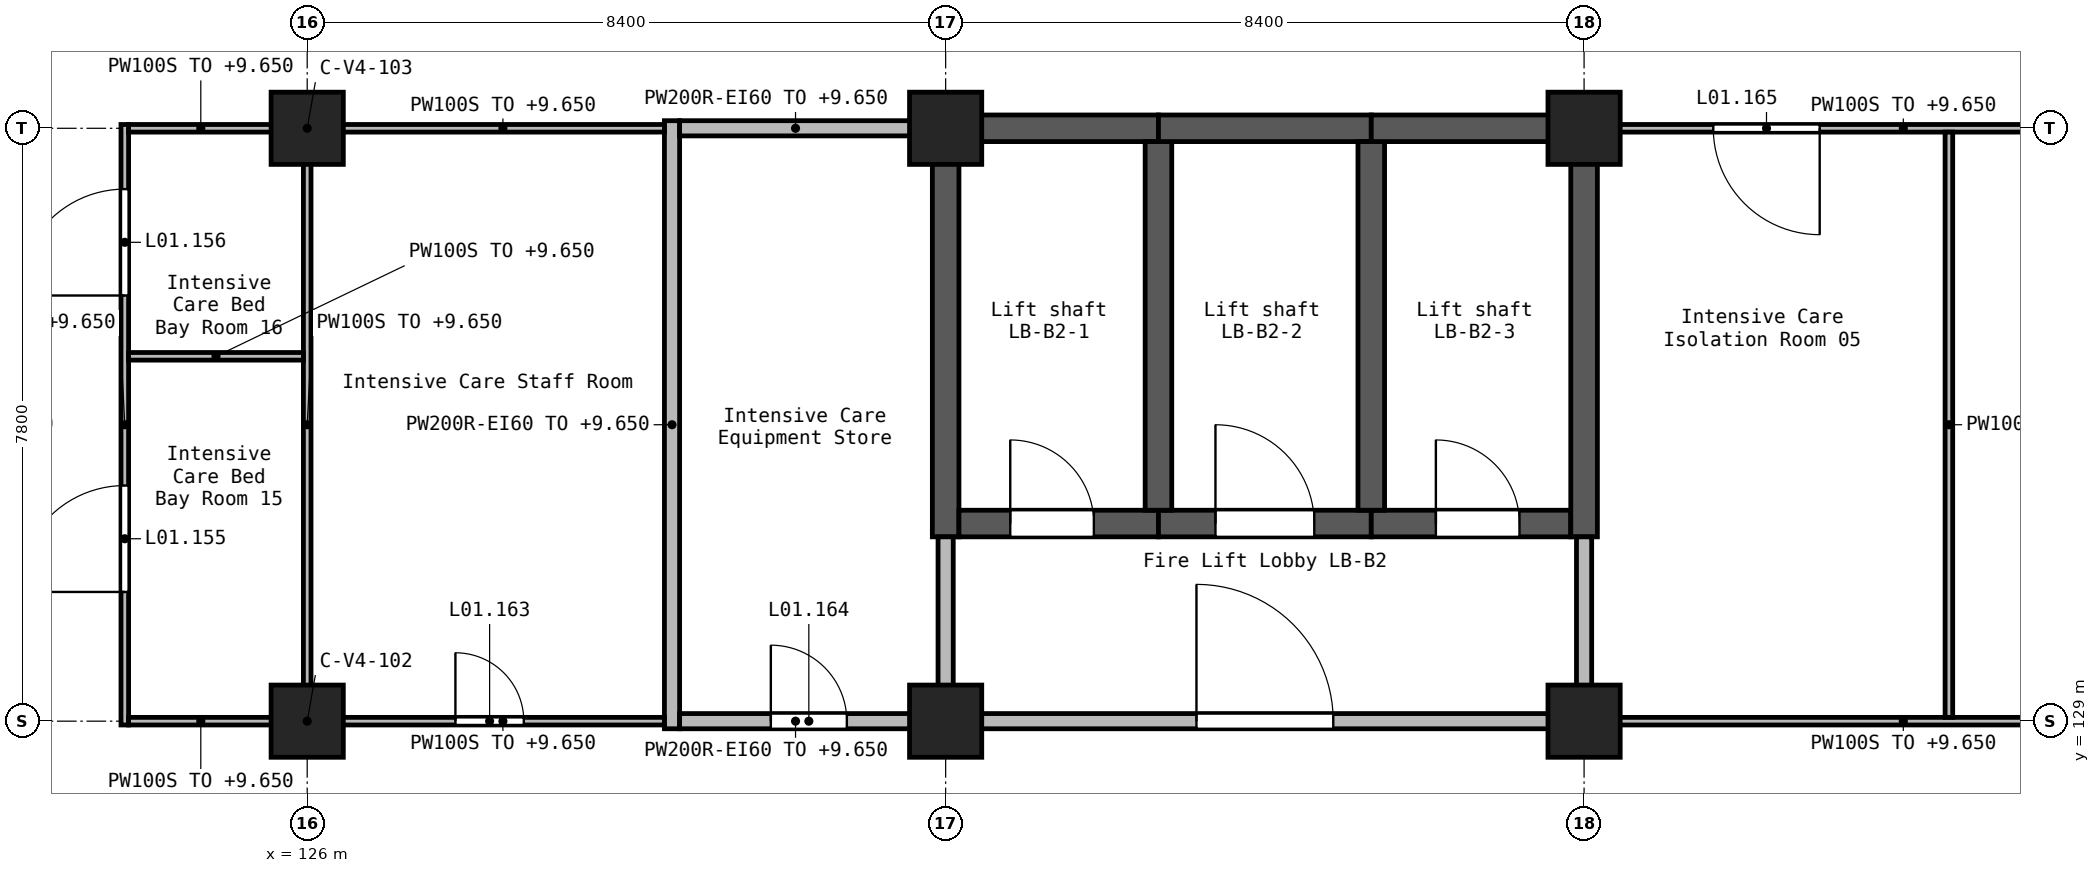
"""IFC4 building model, lengths in metres.
Left out: names, types, materials, properties, quantities, classifications, styles, units other than length and angle.
Written with IfcOpenShell. Run it as: python <this file> out.ifc"""

import sys

from ifc_helpers import new_model, si_unit, direction, frame, frame_2d, origin, origin_2d, place, context, subcontext, project, spatial, rectangle, extrude, element, fill, save


model = new_model("IFC4")
c1 = context("Model", 3, precision=1e-05, world=origin(), true_north=direction((0.0, 1.0)))
c2 = subcontext(c1, "Body", "Model", "MODEL_VIEW")
j1 = project(units=[si_unit("LENGTHUNIT", "METRE"), si_unit("PLANEANGLEUNIT", "RADIAN")], contexts=[c1])
p1 = place(None, origin())
s1 = spatial("IfcSite", under=j1, at=p1, CompositionType="ELEMENT")
p2 = place(p1, origin())
s2 = spatial("IfcBuilding", under=s1, at=p2, CompositionType="ELEMENT")
p3 = place(p2, frame((0.0, 0.0, 5.4)))
s3 = spatial("IfcBuildingStorey", under=s2, at=p3, CompositionType="ELEMENT", Elevation=5.4)
for number, where, z_axis, x_axis in (
    (1, (126.0, 129.0, 0.0), (0.0, 0.0, 1.0), (1.0, 0.0, 0.0)),
    (2, (126.0, 136.8, 0.0), (0.0, 0.0, 1.0), (1.0, 0.0, 0.0)),
    (3, (134.4, 129.0, 0.0), (0.0, 0.0, 1.0), (1.0, 0.0, 0.0)),
    (4, (134.4, 136.8, 0.0), (0.0, 0.0, 1.0), (1.0, 0.0, 0.0)),
    (5, (142.8, 129.0, 0.0), (0.0, 0.0, 1.0), (1.0, 0.0, 0.0)),
    (6, (142.8, 136.8, 0.0), (0.0, 0.0, 1.0), (1.0, 0.0, 0.0)),
):
    element("IfcColumn", number, at=place(p3, frame(where, z_axis=z_axis, x_axis=x_axis)), inside=s3, PredefinedType="COLUMN", context=c2, shape_type="SweptSolid", body=[
        extrude(rectangle(XDim=0.95, YDim=0.95, at=origin_2d()), origin(), (0.0, 0.0, 1.0), 4.5),
    ])
p4 = place(p3, frame((134.225, 136.8, 0.0), z_axis=(0.0, 0.0, 1.0), x_axis=(1.0, 0.0, 0.0)))
e7 = element("IfcWall", 7, at=p4, inside=s3, PredefinedType="SHEAR", context=c2, shape_type="SweptSolid", body=[
    extrude(rectangle(XDim=2.975, YDim=0.35, at=frame_2d((1.487, 0.0))), origin(), (0.0, 0.0, 1.0), 4.5),
])
p5 = place(p3, frame((134.4, 131.425, 0.0), z_axis=(0.0, 0.0, 1.0), x_axis=(0.0, 1.0, 0.0)))
e8 = element("IfcWall", 8, at=p5, inside=s3, PredefinedType="SHEAR", context=c2, shape_type="SweptSolid", body=[
    extrude(rectangle(XDim=5.2, YDim=0.35, at=frame_2d((2.6, 0.0))), origin(), (0.0, 0.0, 1.0), 4.5),
])
p6 = place(p3, frame((134.575, 131.6, 0.0), z_axis=(0.0, 0.0, 1.0), x_axis=(1.0, 0.0, 0.0)))
e9 = element("IfcWall", 9, at=p6, inside=s3, PredefinedType="SHEAR", context=c2, shape_type="SweptSolid", body=[
    extrude(rectangle(XDim=2.625, YDim=0.35, at=frame_2d((1.312, 0.0))), origin(), (0.0, 0.0, 1.0), 4.5),
])
p7 = place(p6, frame((0.675, 0.0, 0.0)))
e10 = element("IfcOpeningElement", 10, at=p7, cuts=e9, PredefinedType="OPENING", context=c2, shape_type="SweptSolid", body=[
    extrude(rectangle(XDim=1.1, YDim=2.1, at=frame_2d((0.55, 1.05))), frame((0.0, 0.185, 0.0), z_axis=(0.0, -1.0, 0.0), x_axis=(1.0, 0.0, 0.0)), (0.0, 0.0, 1.0), 0.37),
])
p8 = place(p3, frame((137.2, 131.6, 0.0), z_axis=(0.0, 0.0, 1.0), x_axis=(1.0, 0.0, 0.0)))
e11 = element("IfcWall", 11, at=p8, inside=s3, PredefinedType="SHEAR", context=c2, shape_type="SweptSolid", body=[
    extrude(rectangle(XDim=2.8, YDim=0.35, at=frame_2d((1.4, 0.0))), origin(), (0.0, 0.0, 1.0), 4.5),
])
p9 = place(p8, frame((0.75, 0.0, 0.0)))
e12 = element("IfcOpeningElement", 12, at=p9, cuts=e11, PredefinedType="OPENING", context=c2, shape_type="SweptSolid", body=[
    extrude(rectangle(XDim=1.3, YDim=2.1, at=frame_2d((0.65, 1.05))), frame((0.0, 0.185, 0.0), z_axis=(0.0, -1.0, 0.0), x_axis=(1.0, 0.0, 0.0)), (0.0, 0.0, 1.0), 0.37),
])
p10 = place(p3, frame((137.2, 131.775, 0.0), z_axis=(0.0, 0.0, 1.0), x_axis=(0.0, 1.0, 0.0)))
e13 = element("IfcWall", 13, at=p10, inside=s3, PredefinedType="SHEAR", context=c2, shape_type="SweptSolid", body=[
    extrude(rectangle(XDim=4.85, YDim=0.35, at=frame_2d((2.425, 0.0))), origin(), (0.0, 0.0, 1.0), 4.5),
])
p11 = place(p3, frame((137.2, 136.8, 0.0), z_axis=(0.0, 0.0, 1.0), x_axis=(1.0, 0.0, 0.0)))
e14 = element("IfcWall", 14, at=p11, inside=s3, PredefinedType="SHEAR", context=c2, shape_type="SweptSolid", body=[
    extrude(rectangle(XDim=2.8, YDim=0.35, at=frame_2d((1.4, 0.0))), origin(), (0.0, 0.0, 1.0), 4.5),
])
p12 = place(p3, frame((140.0, 131.6, 0.0), z_axis=(0.0, 0.0, 1.0), x_axis=(1.0, 0.0, 0.0)))
e15 = element("IfcWall", 15, at=p12, inside=s3, PredefinedType="SHEAR", context=c2, shape_type="SweptSolid", body=[
    extrude(rectangle(XDim=2.625, YDim=0.35, at=frame_2d((1.312, 0.0))), origin(), (0.0, 0.0, 1.0), 4.5),
])
p13 = place(p12, frame((0.85, 0.0, 0.0)))
e16 = element("IfcOpeningElement", 16, at=p13, cuts=e15, PredefinedType="OPENING", context=c2, shape_type="SweptSolid", body=[
    extrude(rectangle(XDim=1.1, YDim=2.1, at=frame_2d((0.55, 1.05))), frame((0.0, 0.185, 0.0), z_axis=(0.0, -1.0, 0.0), x_axis=(1.0, 0.0, 0.0)), (0.0, 0.0, 1.0), 0.37),
])
p14 = place(p3, frame((140.0, 131.775, 0.0), z_axis=(0.0, 0.0, 1.0), x_axis=(0.0, 1.0, 0.0)))
e17 = element("IfcWall", 17, at=p14, inside=s3, PredefinedType="SHEAR", context=c2, shape_type="SweptSolid", body=[
    extrude(rectangle(XDim=4.85, YDim=0.35, at=frame_2d((2.425, 0.0))), origin(), (0.0, 0.0, 1.0), 4.5),
])
p15 = place(p3, frame((140.0, 136.8, 0.0), z_axis=(0.0, 0.0, 1.0), x_axis=(1.0, 0.0, 0.0)))
e18 = element("IfcWall", 18, at=p15, inside=s3, PredefinedType="SHEAR", context=c2, shape_type="SweptSolid", body=[
    extrude(rectangle(XDim=2.625, YDim=0.35, at=frame_2d((1.312, 0.0))), origin(), (0.0, 0.0, 1.0), 4.5),
])
p16 = place(p3, frame((142.8, 131.425, 0.0), z_axis=(0.0, 0.0, 1.0), x_axis=(0.0, 1.0, 0.0)))
e19 = element("IfcWall", 19, at=p16, inside=s3, PredefinedType="SHEAR", context=c2, shape_type="SweptSolid", body=[
    extrude(rectangle(XDim=5.55, YDim=0.35, at=frame_2d((2.775, 0.0))), origin(), (0.0, 0.0, 1.0), 4.5),
])
p17 = place(p3, frame((134.85, 129.0, 0.0), z_axis=(0.0, 0.0, 1.0), x_axis=(1.0, 0.0, 0.0)))
e20 = element("IfcWall", 20, at=p17, inside=s3, PredefinedType="SOLIDWALL", context=c2, shape_type="SweptSolid", body=[
    extrude(rectangle(XDim=7.5, YDim=0.2, at=frame_2d((3.75, 0.0))), origin(), (0.0, 0.0, 1.0), 4.25),
])
p18 = place(p17, frame((2.85, 0.0, 0.0)))
e21 = element("IfcOpeningElement", 21, at=p18, cuts=e20, PredefinedType="OPENING", context=c2, shape_type="SweptSolid", body=[
    extrude(rectangle(XDim=1.8, YDim=2.1, at=frame_2d((0.9, 1.05))), frame((0.0, 0.11, 0.0), z_axis=(0.0, -1.0, 0.0), x_axis=(1.0, 0.0, 0.0)), (0.0, 0.0, 1.0), 0.22),
])
p19 = place(p3, frame((130.8, 128.9, 0.0), z_axis=(0.0, 0.0, 1.0), x_axis=(0.0, 1.0, 0.0)))
e22 = element("IfcWall", 22, at=p19, inside=s3, PredefinedType="SOLIDWALL", context=c2, shape_type="SweptSolid", body=[
    extrude(rectangle(XDim=8.0, YDim=0.2, at=frame_2d((4.0, 0.0))), origin(), (0.0, 0.0, 1.0), 4.25),
])
p20 = place(p3, frame((130.9, 129.0, 0.0), z_axis=(0.0, 0.0, 1.0), x_axis=(1.0, 0.0, 0.0)))
e23 = element("IfcWall", 23, at=p20, inside=s3, PredefinedType="SOLIDWALL", context=c2, shape_type="SweptSolid", body=[
    extrude(rectangle(XDim=3.05, YDim=0.2, at=frame_2d((1.525, 0.0))), origin(), (0.0, 0.0, 1.0), 4.25),
])
p21 = place(p20, frame((1.2, 0.0, 0.0)))
e24 = element("IfcOpeningElement", 24, at=p21, cuts=e23, PredefinedType="OPENING", context=c2, shape_type="SweptSolid", body=[
    extrude(rectangle(XDim=1.0, YDim=2.1, at=frame_2d((0.5, 1.05))), frame((0.0, 0.11, 0.0), z_axis=(0.0, -1.0, 0.0), x_axis=(1.0, 0.0, 0.0)), (0.0, 0.0, 1.0), 0.22),
])
p22 = place(p3, frame((130.9, 136.8, 0.0), z_axis=(0.0, 0.0, 1.0), x_axis=(1.0, 0.0, 0.0)))
e25 = element("IfcWall", 25, at=p22, inside=s3, PredefinedType="SOLIDWALL", context=c2, shape_type="SweptSolid", body=[
    extrude(rectangle(XDim=3.05, YDim=0.2, at=frame_2d((1.525, 0.0))), origin(), (0.0, 0.0, 1.0), 4.25),
])
for number, where, z_axis, x_axis in (
    (26, (134.4, 129.45, 0.0), (0.0, 0.0, 1.0), (0.0, 1.0, 0.0)),
    (27, (142.8, 129.45, 0.0), (0.0, 0.0, 1.0), (0.0, 1.0, 0.0)),
):
    element("IfcWall", number, at=place(p3, frame(where, z_axis=z_axis, x_axis=x_axis)), inside=s3, PredefinedType="SOLIDWALL", context=c2, shape_type="SweptSolid", body=[
        extrude(rectangle(XDim=1.975, YDim=0.2, at=frame_2d((0.988, 0.0))), origin(), (0.0, 0.0, 1.0), 4.25),
    ])
p23 = place(p3, frame((150.75, 136.8, 0.0), z_axis=(0.0, 0.0, 1.0), x_axis=(-1.0, 0.0, 0.0)))
e28 = element("IfcWall", 28, at=p23, inside=s3, PredefinedType="PARTITIONING", context=c2, shape_type="SweptSolid", body=[
    extrude(rectangle(XDim=7.5, YDim=0.1, at=frame_2d((3.75, 0.0))), origin(), (0.0, 0.0, 1.0), 4.25),
])
p24 = place(p23, frame((4.85, 0.0, 0.0)))
e29 = element("IfcOpeningElement", 29, at=p24, cuts=e28, PredefinedType="OPENING", context=c2, shape_type="SweptSolid", body=[
    extrude(rectangle(XDim=1.4, YDim=2.1, at=frame_2d((0.7, 1.05))), frame((0.0, 0.06, 0.0), z_axis=(0.0, -1.0, 0.0), x_axis=(1.0, 0.0, 0.0)), (0.0, 0.0, 1.0), 0.12),
])
p25 = place(p3, frame((143.25, 129.0, 0.0), z_axis=(0.0, 0.0, 1.0), x_axis=(1.0, 0.0, 0.0)))
e30 = element("IfcWall", 30, at=p25, inside=s3, PredefinedType="PARTITIONING", context=c2, shape_type="SweptSolid", body=[
    extrude(rectangle(XDim=7.5, YDim=0.1, at=frame_2d((3.75, 0.0))), origin(), (0.0, 0.0, 1.0), 4.25),
])
p26 = place(p3, frame((123.6, 128.95, 0.0), z_axis=(0.0, 0.0, 1.0), x_axis=(0.0, 1.0, 0.0)))
e31 = element("IfcWall", 31, at=p26, inside=s3, PredefinedType="PARTITIONING", context=c2, shape_type="SweptSolid", body=[
    extrude(rectangle(XDim=7.9, YDim=0.1, at=frame_2d((3.95, 0.0))), origin(), (0.0, 0.0, 1.0), 4.25),
])
p27 = place(p26, frame((1.75, 0.0, 0.0)))
e32 = element("IfcOpeningElement", 32, at=p27, cuts=e31, PredefinedType="OPENING", context=c2, shape_type="SweptSolid", body=[
    extrude(rectangle(XDim=1.4, YDim=2.1, at=frame_2d((0.7, 1.05))), frame((0.0, 0.06, 0.0), z_axis=(0.0, -1.0, 0.0), x_axis=(1.0, 0.0, 0.0)), (0.0, 0.0, 1.0), 0.12),
])
p28 = place(p26, frame((5.65, 0.0, 0.0)))
e33 = element("IfcOpeningElement", 33, at=p28, cuts=e31, PredefinedType="OPENING", context=c2, shape_type="SweptSolid", body=[
    extrude(rectangle(XDim=1.4, YDim=2.1, at=frame_2d((0.7, 1.05))), frame((0.0, 0.06, 0.0), z_axis=(0.0, -1.0, 0.0), x_axis=(1.0, 0.0, 0.0)), (0.0, 0.0, 1.0), 0.12),
])
p29 = place(p3, frame((123.65, 129.0, 0.0), z_axis=(0.0, 0.0, 1.0), x_axis=(1.0, 0.0, 0.0)))
e34 = element("IfcWall", 34, at=p29, inside=s3, PredefinedType="PARTITIONING", context=c2, shape_type="SweptSolid", body=[
    extrude(rectangle(XDim=1.9, YDim=0.1, at=frame_2d((0.95, 0.0))), origin(), (0.0, 0.0, 1.0), 4.25),
])
p30 = place(p3, frame((126.45, 129.0, 0.0), z_axis=(0.0, 0.0, 1.0), x_axis=(1.0, 0.0, 0.0)))
e35 = element("IfcWall", 35, at=p30, inside=s3, PredefinedType="PARTITIONING", context=c2, shape_type="SweptSolid", body=[
    extrude(rectangle(XDim=4.25, YDim=0.1, at=frame_2d((2.125, 0.0))), origin(), (0.0, 0.0, 1.0), 4.25),
])
p31 = place(p30, frame((1.5, 0.0, 0.0)))
e36 = element("IfcOpeningElement", 36, at=p31, cuts=e35, PredefinedType="OPENING", context=c2, shape_type="SweptSolid", body=[
    extrude(rectangle(XDim=0.9, YDim=2.1, at=frame_2d((0.45, 1.05))), frame((0.0, 0.06, 0.0), z_axis=(0.0, -1.0, 0.0), x_axis=(1.0, 0.0, 0.0)), (0.0, 0.0, 1.0), 0.12),
])
p32 = place(p3, frame((123.65, 136.8, 0.0), z_axis=(0.0, 0.0, 1.0), x_axis=(1.0, 0.0, 0.0)))
e37 = element("IfcWall", 37, at=p32, inside=s3, PredefinedType="PARTITIONING", context=c2, shape_type="SweptSolid", body=[
    extrude(rectangle(XDim=1.9, YDim=0.1, at=frame_2d((0.95, 0.0))), origin(), (0.0, 0.0, 1.0), 4.25),
])
p33 = place(p3, frame((126.45, 136.8, 0.0), z_axis=(0.0, 0.0, 1.0), x_axis=(1.0, 0.0, 0.0)))
e38 = element("IfcWall", 38, at=p33, inside=s3, PredefinedType="PARTITIONING", context=c2, shape_type="SweptSolid", body=[
    extrude(rectangle(XDim=4.25, YDim=0.1, at=frame_2d((2.125, 0.0))), origin(), (0.0, 0.0, 1.0), 4.25),
])
p34 = place(p3, frame((126.0, 129.45, 0.0), z_axis=(0.0, 0.0, 1.0), x_axis=(0.0, 1.0, 0.0)))
e39 = element("IfcWall", 39, at=p34, inside=s3, PredefinedType="PARTITIONING", context=c2, shape_type="SweptSolid", body=[
    extrude(rectangle(XDim=6.9, YDim=0.1, at=frame_2d((3.45, 0.0))), origin(), (0.0, 0.0, 1.0), 4.25),
])
p35 = place(p3, frame((147.6, 129.05, 0.0), z_axis=(0.0, 0.0, 1.0), x_axis=(0.0, 1.0, 0.0)))
e40 = element("IfcWall", 40, at=p35, inside=s3, PredefinedType="PARTITIONING", context=c2, shape_type="SweptSolid", body=[
    extrude(rectangle(XDim=7.7, YDim=0.1, at=frame_2d((3.85, 0.0))), origin(), (0.0, 0.0, 1.0), 4.25),
])
p36 = place(p3, frame((123.65, 133.8, 0.0), z_axis=(0.0, 0.0, 1.0), x_axis=(1.0, 0.0, 0.0)))
e41 = element("IfcWall", 41, at=p36, inside=s3, PredefinedType="PARTITIONING", context=c2, shape_type="SweptSolid", body=[
    extrude(rectangle(XDim=2.3, YDim=0.1, at=frame_2d((1.15, 0.0))), origin(), (0.0, 0.0, 1.0), 4.25),
])
p37 = place(p18, origin())
e42 = element("IfcDoor", 42, at=p37, inside=s3, OperationType="DOUBLE_DOOR_SINGLE_SWING", PredefinedType="DOOR", context=c2, shape_type="SweptSolid", body=[
    extrude(rectangle(XDim=1.8, YDim=2.1, at=frame_2d((0.9, 1.05))), frame((0.0, 0.025, 0.0), z_axis=(0.0, -1.0, 0.0), x_axis=(1.0, 0.0, 0.0)), (0.0, 0.0, 1.0), 0.05),
])
fill(e21, e42)
p38 = place(p27, frame((1.4, 0.0, 0.0), z_axis=(0.0, 0.0, 1.0), x_axis=(-1.0, 0.0, 0.0)))
e43 = element("IfcDoor", 43, at=p38, inside=s3, OperationType="DOUBLE_DOOR_SINGLE_SWING", PredefinedType="DOOR", context=c2, shape_type="SweptSolid", body=[
    extrude(rectangle(XDim=1.4, YDim=2.1, at=frame_2d((0.7, 1.05))), frame((0.0, 0.025, 0.0), z_axis=(0.0, -1.0, 0.0), x_axis=(1.0, 0.0, 0.0)), (0.0, 0.0, 1.0), 0.05),
])
fill(e32, e43)
p39 = place(p28, frame((1.4, 0.0, 0.0), z_axis=(0.0, 0.0, 1.0), x_axis=(-1.0, 0.0, 0.0)))
e44 = element("IfcDoor", 44, at=p39, inside=s3, OperationType="DOUBLE_DOOR_SINGLE_SWING", PredefinedType="DOOR", context=c2, shape_type="SweptSolid", body=[
    extrude(rectangle(XDim=1.4, YDim=2.1, at=frame_2d((0.7, 1.05))), frame((0.0, 0.025, 0.0), z_axis=(0.0, -1.0, 0.0), x_axis=(1.0, 0.0, 0.0)), (0.0, 0.0, 1.0), 0.05),
])
fill(e33, e44)
p40 = place(p31, origin())
e45 = element("IfcDoor", 45, at=p40, inside=s3, OperationType="SINGLE_SWING_LEFT", PredefinedType="DOOR", context=c2, shape_type="SweptSolid", body=[
    extrude(rectangle(XDim=0.9, YDim=2.1, at=frame_2d((0.45, 1.05))), frame((0.0, 0.025, 0.0), z_axis=(0.0, -1.0, 0.0), x_axis=(1.0, 0.0, 0.0)), (0.0, 0.0, 1.0), 0.05),
])
fill(e36, e45)
p41 = place(p21, origin())
e46 = element("IfcDoor", 46, at=p41, inside=s3, OperationType="SINGLE_SWING_RIGHT", PredefinedType="DOOR", context=c2, shape_type="SweptSolid", body=[
    extrude(rectangle(XDim=1.0, YDim=2.1, at=frame_2d((0.5, 1.05))), frame((0.0, 0.025, 0.0), z_axis=(0.0, -1.0, 0.0), x_axis=(1.0, 0.0, 0.0)), (0.0, 0.0, 1.0), 0.05),
])
fill(e24, e46)
p42 = place(p24, origin())
e47 = element("IfcDoor", 47, at=p42, inside=s3, OperationType="DOUBLE_DOOR_SINGLE_SWING", PredefinedType="DOOR", context=c2, shape_type="SweptSolid", body=[
    extrude(rectangle(XDim=1.4, YDim=2.1, at=frame_2d((0.7, 1.05))), frame((0.0, 0.025, 0.0), z_axis=(0.0, -1.0, 0.0), x_axis=(1.0, 0.0, 0.0)), (0.0, 0.0, 1.0), 0.05),
])
fill(e29, e47)
p43 = place(p7, origin())
e48 = element("IfcDoor", 48, at=p43, inside=s3, OperationType="DOUBLE_DOOR_SLIDING", PredefinedType="DOOR", context=c2, shape_type="SweptSolid", body=[
    extrude(rectangle(XDim=1.1, YDim=2.1, at=frame_2d((0.55, 1.05))), frame((0.0, 0.025, 0.0), z_axis=(0.0, -1.0, 0.0), x_axis=(1.0, 0.0, 0.0)), (0.0, 0.0, 1.0), 0.05),
])
fill(e10, e48)
p44 = place(p9, origin())
e49 = element("IfcDoor", 49, at=p44, inside=s3, OperationType="DOUBLE_DOOR_SLIDING", PredefinedType="DOOR", context=c2, shape_type="SweptSolid", body=[
    extrude(rectangle(XDim=1.3, YDim=2.1, at=frame_2d((0.65, 1.05))), frame((0.0, 0.025, 0.0), z_axis=(0.0, -1.0, 0.0), x_axis=(1.0, 0.0, 0.0)), (0.0, 0.0, 1.0), 0.05),
])
fill(e12, e49)
p45 = place(p13, origin())
e50 = element("IfcDoor", 50, at=p45, inside=s3, OperationType="DOUBLE_DOOR_SLIDING", PredefinedType="DOOR", context=c2, shape_type="SweptSolid", body=[
    extrude(rectangle(XDim=1.1, YDim=2.1, at=frame_2d((0.55, 1.05))), frame((0.0, 0.025, 0.0), z_axis=(0.0, -1.0, 0.0), x_axis=(1.0, 0.0, 0.0)), (0.0, 0.0, 1.0), 0.05),
])
fill(e16, e50)
save(model, sys.argv[1])
